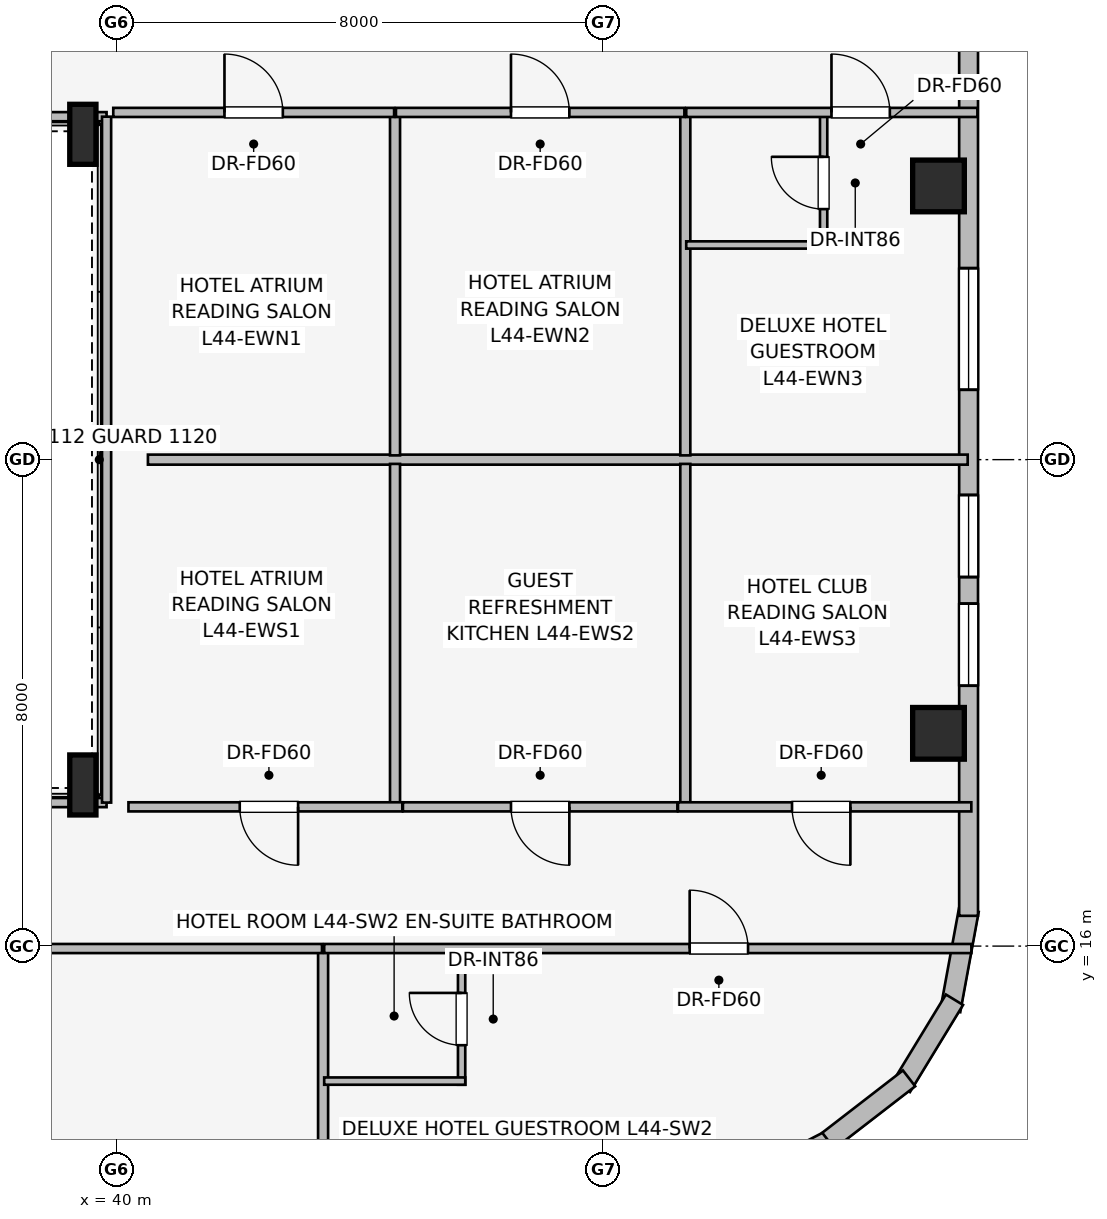
"""IFC4 building model, lengths in metres.
Left out: names, types, materials, properties, quantities, classifications, styles, units other than length and angle.
Written with IfcOpenShell. Run it as: python <this file> out.ifc"""

import sys

from ifc_helpers import new_model, si_unit, direction, frame, frame_2d, origin, origin_2d, place, context, subcontext, project, spatial, rectangle, i_section, extrude, element, fill, save


model = new_model("IFC4")
c1 = context("Model", 3, precision=1e-05, world=origin(), true_north=direction((0.0, 1.0)))
c2 = subcontext(c1, "Body", "Model", "MODEL_VIEW")
j1 = project(units=[si_unit("LENGTHUNIT", "METRE"), si_unit("PLANEANGLEUNIT", "RADIAN")], contexts=[c1])
p1 = place(None, origin())
s1 = spatial("IfcSite", under=j1, at=p1, CompositionType="ELEMENT")
p2 = place(p1, origin())
s2 = spatial("IfcBuilding", under=s1, at=p2, CompositionType="ELEMENT")
p3 = place(p2, frame((0.0, 0.0, 163.65)))
s3 = spatial("IfcBuildingStorey", under=s2, at=p3, CompositionType="ELEMENT", Elevation=163.65)
for number, where, z_axis, x_axis in (
    (1, (53.522, 19.499, 0.0), (0.0, 0.0, 1.0), (1.0, 0.0, 0.0)),
    (2, (53.522, 28.501, 0.0), (0.0, 0.0, 1.0), (1.0, 0.0, 0.0)),
):
    element("IfcColumn", number, at=place(p3, frame(where, z_axis=z_axis, x_axis=x_axis)), inside=s3, PredefinedType="COLUMN", context=c2, shape_type="SweptSolid", body=[
        extrude(rectangle(XDim=0.85, YDim=0.85, at=origin_2d()), origin(), (0.0, 0.0, 1.0), 3.45),
    ])
for number, where, z_axis, x_axis in (
    (3, (39.45, 18.65, 0.0), (0.0, 0.0, 1.0), (1.0, 0.0, 0.0)),
    (4, (39.45, 29.35, 0.0), (0.0, 0.0, 1.0), (1.0, 0.0, 0.0)),
):
    element("IfcColumn", number, at=place(p3, frame(where, z_axis=z_axis, x_axis=x_axis)), inside=s3, PredefinedType="COLUMN", context=c2, shape_type="SweptSolid", body=[
        extrude(i_section(OverallWidth=0.431, OverallDepth=0.987, WebThickness=0.034, FlangeThickness=0.062, at=origin_2d()), origin(), (0.0, 0.0, 1.0), 3.45),
    ])
p4 = place(p3, frame((51.792, 12.847, 0.0), z_axis=(0.0, 0.0, 1.0), x_axis=(-0.888626188278, -0.458632202867, 0.0)))
e5 = element("IfcWall", 5, at=p4, inside=s3, PredefinedType="STANDARD", context=c2, shape_type="SweptSolid", body=[
    extrude(rectangle(XDim=16.828, YDim=0.31, at=frame_2d((8.414, 0.0))), origin(), (0.0, 0.0, 1.0), 3.19),
])
p5 = place(p4, frame((0.675, 0.0, 0.75)))
e6 = element("IfcOpeningElement", 6, at=p5, cuts=e5, PredefinedType="OPENING", context=c2, shape_type="SweptSolid", body=[
    extrude(rectangle(XDim=2.0, YDim=1.5, at=frame_2d((1.0, 0.75))), frame((0.0, 0.165, 0.0), z_axis=(0.0, -1.0, 0.0), x_axis=(1.0, 0.0, 0.0)), (0.0, 0.0, 1.0), 0.33),
])
p6 = place(p4, frame((4.541, 0.0, 0.75)))
e7 = element("IfcOpeningElement", 7, at=p6, cuts=e5, PredefinedType="OPENING", context=c2, shape_type="SweptSolid", body=[
    extrude(rectangle(XDim=1.35, YDim=1.45, at=frame_2d((0.675, 0.725))), frame((0.0, 0.165, 0.0), z_axis=(0.0, -1.0, 0.0), x_axis=(1.0, 0.0, 0.0)), (0.0, 0.0, 1.0), 0.33),
])
p7 = place(p4, frame((7.112, 0.0, 0.75)))
e8 = element("IfcOpeningElement", 8, at=p7, cuts=e5, PredefinedType="OPENING", context=c2, shape_type="SweptSolid", body=[
    extrude(rectangle(XDim=1.35, YDim=1.45, at=frame_2d((0.675, 0.725))), frame((0.0, 0.165, 0.0), z_axis=(0.0, -1.0, 0.0), x_axis=(1.0, 0.0, 0.0)), (0.0, 0.0, 1.0), 0.33),
])
p8 = place(p4, frame((10.348, 0.0, 0.75)))
e9 = element("IfcOpeningElement", 9, at=p8, cuts=e5, PredefinedType="OPENING", context=c2, shape_type="SweptSolid", body=[
    extrude(rectangle(XDim=2.0, YDim=1.5, at=frame_2d((1.0, 0.75))), frame((0.0, 0.165, 0.0), z_axis=(0.0, -1.0, 0.0), x_axis=(1.0, 0.0, 0.0)), (0.0, 0.0, 1.0), 0.33),
])
p9 = place(p4, frame((14.478, 0.0, 0.75)))
e10 = element("IfcOpeningElement", 10, at=p9, cuts=e5, PredefinedType="OPENING", context=c2, shape_type="SweptSolid", body=[
    extrude(rectangle(XDim=1.35, YDim=1.45, at=frame_2d((0.675, 0.725))), frame((0.0, 0.165, 0.0), z_axis=(0.0, -1.0, 0.0), x_axis=(1.0, 0.0, 0.0)), (0.0, 0.0, 1.0), 0.33),
])
p10 = place(p3, frame((54.021, 16.592, 0.0), z_axis=(0.0, 0.0, 1.0), x_axis=(-0.180717642671, -0.983535019014, 0.0)))
e11 = element("IfcWall", 11, at=p10, inside=s3, PredefinedType="STANDARD", context=c2, shape_type="SweptSolid", body=[
    extrude(rectangle(XDim=1.677, YDim=0.33, at=frame_2d((0.838, 0.0))), origin(), (0.0, 0.0, 1.0), 3.19),
])
p11 = place(p3, frame((53.785, 15.118, 0.0), z_axis=(0.0, 0.0, 1.0), x_axis=(-0.520219286058, -0.85403272444, 0.0)))
e12 = element("IfcWall", 12, at=p11, inside=s3, PredefinedType="STANDARD", context=c2, shape_type="SweptSolid", body=[
    extrude(rectangle(XDim=1.678, YDim=0.33, at=frame_2d((0.839, 0.0))), origin(), (0.0, 0.0, 1.0), 3.19),
])
p12 = place(p3, frame((53.038, 13.825, 0.0), z_axis=(0.0, 0.0, 1.0), x_axis=(-0.791464279355, -0.611215423976, 0.0)))
e13 = element("IfcWall", 13, at=p12, inside=s3, PredefinedType="STANDARD", context=c2, shape_type="SweptSolid", body=[
    extrude(rectangle(XDim=1.677, YDim=0.33, at=frame_2d((0.838, 0.0))), origin(), (0.0, 0.0, 1.0), 3.19),
])
p13 = place(p3, frame((54.017, 31.502, 0.0), z_axis=(0.0, 0.0, 1.0), x_axis=(0.0, -1.0, 0.0)))
e14 = element("IfcWall", 14, at=p13, inside=s3, PredefinedType="STANDARD", context=c2, shape_type="SweptSolid", body=[
    extrude(rectangle(XDim=15.004, YDim=0.31, at=frame_2d((7.502, 0.0))), origin(), (0.0, 0.0, 1.0), 3.19),
])
p14 = place(p13, frame((4.353, 0.0, 0.75)))
e15 = element("IfcOpeningElement", 15, at=p14, cuts=e14, PredefinedType="OPENING", context=c2, shape_type="SweptSolid", body=[
    extrude(rectangle(XDim=2.0, YDim=1.5, at=frame_2d((1.0, 0.75))), frame((0.0, 0.165, 0.0), z_axis=(0.0, -1.0, 0.0), x_axis=(1.0, 0.0, 0.0)), (0.0, 0.0, 1.0), 0.33),
])
p15 = place(p13, frame((8.083, 0.0, 0.75)))
e16 = element("IfcOpeningElement", 16, at=p15, cuts=e14, PredefinedType="OPENING", context=c2, shape_type="SweptSolid", body=[
    extrude(rectangle(XDim=1.35, YDim=1.45, at=frame_2d((0.675, 0.725))), frame((0.0, 0.165, 0.0), z_axis=(0.0, -1.0, 0.0), x_axis=(1.0, 0.0, 0.0)), (0.0, 0.0, 1.0), 0.33),
])
p16 = place(p13, frame((9.87, 0.0, 0.75)))
e17 = element("IfcOpeningElement", 17, at=p16, cuts=e14, PredefinedType="OPENING", context=c2, shape_type="SweptSolid", body=[
    extrude(rectangle(XDim=1.35, YDim=1.45, at=frame_2d((0.675, 0.725))), frame((0.0, 0.165, 0.0), z_axis=(0.0, -1.0, 0.0), x_axis=(1.0, 0.0, 0.0)), (0.0, 0.0, 1.0), 0.33),
])
p17 = place(p3, frame((27.675, 18.36, 0.0), z_axis=(0.0, 0.0, 1.0), x_axis=(1.0, 0.0, 0.0)))
e18 = element("IfcWall", 18, at=p17, inside=s3, PredefinedType="PARTITIONING", context=c2, shape_type="SweptSolid", body=[
    extrude(rectangle(XDim=12.165, YDim=0.15, at=frame_2d((6.083, 0.0))), origin(), (0.0, 0.0, 1.0), 2.331),
])
p18 = place(p3, frame((39.84, 29.64, 0.0), z_axis=(0.0, 0.0, 1.0), x_axis=(-1.0, 0.0, 0.0)))
e19 = element("IfcWall", 19, at=p18, inside=s3, PredefinedType="PARTITIONING", context=c2, shape_type="SweptSolid", body=[
    extrude(rectangle(XDim=12.2, YDim=0.15, at=frame_2d((6.1, 0.0))), origin(), (0.0, 0.0, 1.0), 2.331),
])
p19 = place(p3, frame((39.84, 18.36, 0.0), z_axis=(0.0, 0.0, 1.0), x_axis=(0.0, 1.0, 0.0)))
e20 = element("IfcWall", 20, at=p19, inside=s3, PredefinedType="PARTITIONING", context=c2, shape_type="SweptSolid", body=[
    extrude(rectangle(XDim=11.28, YDim=0.15, at=frame_2d((5.64, 0.0))), origin(), (0.0, 0.0, 1.0), 3.19),
])
p20 = place(p3, frame((40.52, 24.0, 0.0), z_axis=(0.0, 0.0, 1.0), x_axis=(1.0, 0.0, 0.0)))
e21 = element("IfcWall", 21, at=p20, inside=s3, PredefinedType="PARTITIONING", context=c2, shape_type="SweptSolid", body=[
    extrude(rectangle(XDim=13.482, YDim=0.165, at=frame_2d((6.741, 0.0))), origin(), (0.0, 0.0, 1.0), 2.494),
])
for number, where, z_axis, x_axis in (
    (22, (44.584, 24.07, 0.0), (0.0, 0.0, 1.0), (0.0, 1.0, 0.0)),
    (23, (49.358, 24.07, 0.0), (0.0, 0.0, 1.0), (0.0, 1.0, 0.0)),
):
    element("IfcWall", number, at=place(p3, frame(where, z_axis=z_axis, x_axis=x_axis)), inside=s3, PredefinedType="PARTITIONING", context=c2, shape_type="SweptSolid", body=[
        extrude(rectangle(XDim=5.64, YDim=0.165, at=frame_2d((2.82, 0.0))), origin(), (0.0, 0.0, 1.0), 3.19),
    ])
p21 = place(p3, frame((39.95, 29.71, 0.0), z_axis=(0.0, 0.0, 1.0), x_axis=(1.0, 0.0, 0.0)))
e24 = element("IfcWall", 24, at=p21, inside=s3, PredefinedType="PARTITIONING", context=c2, shape_type="SweptSolid", body=[
    extrude(rectangle(XDim=4.619, YDim=0.15, at=frame_2d((2.31, 0.0))), origin(), (0.0, 0.0, 1.0), 3.19),
])
p22 = place(p21, frame((1.829, 0.0, 0.0)))
e25 = element("IfcOpeningElement", 25, at=p22, cuts=e24, PredefinedType="OPENING", context=c2, shape_type="SweptSolid", body=[
    extrude(rectangle(XDim=0.96, YDim=2.0, at=frame_2d((0.48, 1.0))), frame((0.0, 0.085, 0.0), z_axis=(0.0, -1.0, 0.0), x_axis=(1.0, 0.0, 0.0)), (0.0, 0.0, 1.0), 0.17),
])
p23 = place(p3, frame((44.599, 29.71, 0.0), z_axis=(0.0, 0.0, 1.0), x_axis=(1.0, 0.0, 0.0)))
e26 = element("IfcWall", 26, at=p23, inside=s3, PredefinedType="PARTITIONING", context=c2, shape_type="SweptSolid", body=[
    extrude(rectangle(XDim=4.744, YDim=0.15, at=frame_2d((2.372, 0.0))), origin(), (0.0, 0.0, 1.0), 3.19),
])
p24 = place(p23, frame((1.892, 0.0, 0.0)))
e27 = element("IfcOpeningElement", 27, at=p24, cuts=e26, PredefinedType="OPENING", context=c2, shape_type="SweptSolid", body=[
    extrude(rectangle(XDim=0.96, YDim=2.0, at=frame_2d((0.48, 1.0))), frame((0.0, 0.085, 0.0), z_axis=(0.0, -1.0, 0.0), x_axis=(1.0, 0.0, 0.0)), (0.0, 0.0, 1.0), 0.17),
])
p25 = place(p3, frame((51.633, 27.47, 0.0), z_axis=(0.0, 0.0, 1.0), x_axis=(0.0, 1.0, 0.0)))
e28 = element("IfcWall", 28, at=p25, inside=s3, PredefinedType="PARTITIONING", context=c2, shape_type="SweptSolid", body=[
    extrude(rectangle(XDim=2.24, YDim=0.12, at=frame_2d((1.12, 0.0))), origin(), (0.0, 0.0, 1.0), 3.19),
])
p26 = place(p25, frame((0.65, 0.0, 0.0)))
e29 = element("IfcOpeningElement", 29, at=p26, cuts=e28, PredefinedType="OPENING", context=c2, shape_type="SweptSolid", body=[
    extrude(rectangle(XDim=0.86, YDim=2.0, at=frame_2d((0.43, 1.0))), frame((0.0, 0.07, 0.0), z_axis=(0.0, -1.0, 0.0), x_axis=(1.0, 0.0, 0.0)), (0.0, 0.0, 1.0), 0.14),
])
p27 = place(p3, frame((49.373, 27.53, 0.0), z_axis=(0.0, 0.0, 1.0), x_axis=(1.0, 0.0, 0.0)))
e30 = element("IfcWall", 30, at=p27, inside=s3, PredefinedType="PARTITIONING", context=c2, shape_type="SweptSolid", body=[
    extrude(rectangle(XDim=2.32, YDim=0.12, at=frame_2d((1.16, 0.0))), origin(), (0.0, 0.0, 1.0), 2.494),
])
p28 = place(p3, frame((49.373, 29.71, 0.0), z_axis=(0.0, 0.0, 1.0), x_axis=(1.0, 0.0, 0.0)))
e31 = element("IfcWall", 31, at=p28, inside=s3, PredefinedType="PARTITIONING", context=c2, shape_type="SweptSolid", body=[
    extrude(rectangle(XDim=4.789, YDim=0.15, at=frame_2d((2.395, 0.0))), origin(), (0.0, 0.0, 1.0), 3.19),
])
p29 = place(p28, frame((2.389, 0.0, 0.0)))
e32 = element("IfcOpeningElement", 32, at=p29, cuts=e31, PredefinedType="OPENING", context=c2, shape_type="SweptSolid", body=[
    extrude(rectangle(XDim=0.96, YDim=2.0, at=frame_2d((0.48, 1.0))), frame((0.0, 0.085, 0.0), z_axis=(0.0, -1.0, 0.0), x_axis=(1.0, 0.0, 0.0)), (0.0, 0.0, 1.0), 0.17),
])
for number, where, z_axis, x_axis in (
    (33, (44.584, 18.29, 0.0), (0.0, 0.0, 1.0), (0.0, 1.0, 0.0)),
    (34, (49.358, 18.29, 0.0), (0.0, 0.0, 1.0), (0.0, 1.0, 0.0)),
):
    element("IfcWall", number, at=place(p3, frame(where, z_axis=z_axis, x_axis=x_axis)), inside=s3, PredefinedType="PARTITIONING", context=c2, shape_type="SweptSolid", body=[
        extrude(rectangle(XDim=5.64, YDim=0.165, at=frame_2d((2.82, 0.0))), origin(), (0.0, 0.0, 1.0), 3.19),
    ])
p30 = place(p3, frame((44.704, 18.29, 0.0), z_axis=(0.0, 0.0, 1.0), x_axis=(-1.0, 0.0, 0.0)))
e35 = element("IfcWall", 35, at=p30, inside=s3, PredefinedType="PARTITIONING", context=c2, shape_type="SweptSolid", body=[
    extrude(rectangle(XDim=4.504, YDim=0.15, at=frame_2d((2.252, 0.0))), origin(), (0.0, 0.0, 1.0), 3.19),
])
p31 = place(p30, frame((1.714, 0.0, 0.0)))
e36 = element("IfcOpeningElement", 36, at=p31, cuts=e35, PredefinedType="OPENING", context=c2, shape_type="SweptSolid", body=[
    extrude(rectangle(XDim=0.96, YDim=2.0, at=frame_2d((0.48, 1.0))), frame((0.0, 0.085, 0.0), z_axis=(0.0, -1.0, 0.0), x_axis=(1.0, 0.0, 0.0)), (0.0, 0.0, 1.0), 0.17),
])
p32 = place(p3, frame((49.228, 18.29, 0.0), z_axis=(0.0, 0.0, 1.0), x_axis=(-1.0, 0.0, 0.0)))
e37 = element("IfcWall", 37, at=p32, inside=s3, PredefinedType="PARTITIONING", context=c2, shape_type="SweptSolid", body=[
    extrude(rectangle(XDim=4.514, YDim=0.15, at=frame_2d((2.257, 0.0))), origin(), (0.0, 0.0, 1.0), 3.19),
])
p33 = place(p32, frame((1.777, 0.0, 0.0)))
e38 = element("IfcOpeningElement", 38, at=p33, cuts=e37, PredefinedType="OPENING", context=c2, shape_type="SweptSolid", body=[
    extrude(rectangle(XDim=0.96, YDim=2.0, at=frame_2d((0.48, 1.0))), frame((0.0, 0.085, 0.0), z_axis=(0.0, -1.0, 0.0), x_axis=(1.0, 0.0, 0.0)), (0.0, 0.0, 1.0), 0.17),
])
p34 = place(p3, frame((54.062, 18.29, 0.0), z_axis=(0.0, 0.0, 1.0), x_axis=(-1.0, 0.0, 0.0)))
e39 = element("IfcWall", 39, at=p34, inside=s3, PredefinedType="PARTITIONING", context=c2, shape_type="SweptSolid", body=[
    extrude(rectangle(XDim=4.824, YDim=0.15, at=frame_2d((2.412, 0.0))), origin(), (0.0, 0.0, 1.0), 3.19),
])
p35 = place(p34, frame((1.989, 0.0, 0.0)))
e40 = element("IfcOpeningElement", 40, at=p35, cuts=e39, PredefinedType="OPENING", context=c2, shape_type="SweptSolid", body=[
    extrude(rectangle(XDim=0.96, YDim=2.0, at=frame_2d((0.48, 1.0))), frame((0.0, 0.085, 0.0), z_axis=(0.0, -1.0, 0.0), x_axis=(1.0, 0.0, 0.0)), (0.0, 0.0, 1.0), 0.17),
])
p36 = place(p3, frame((43.401, 8.533, 0.0), z_axis=(0.0, 0.0, 1.0), x_axis=(0.0, 1.0, 0.0)))
e41 = element("IfcWall", 41, at=p36, inside=s3, PredefinedType="PARTITIONING", context=c2, shape_type="SweptSolid", body=[
    extrude(rectangle(XDim=7.397, YDim=0.165, at=frame_2d((3.698, 0.0))), origin(), (0.0, 0.0, 1.0), 3.19),
])
p37 = place(p3, frame((32.85, 15.96, 0.0), z_axis=(0.0, 0.0, 1.0), x_axis=(1.0, 0.0, 0.0)))
e42 = element("IfcWall", 42, at=p37, inside=s3, PredefinedType="PARTITIONING", context=c2, shape_type="SweptSolid", body=[
    extrude(rectangle(XDim=10.533, YDim=0.15, at=frame_2d((5.267, 0.0))), origin(), (0.0, 0.0, 1.0), 3.19),
])
p38 = place(p37, frame((4.787, 0.0, 0.0)))
e43 = element("IfcOpeningElement", 43, at=p38, cuts=e42, PredefinedType="OPENING", context=c2, shape_type="SweptSolid", body=[
    extrude(rectangle(XDim=0.96, YDim=2.0, at=frame_2d((0.48, 1.0))), frame((0.0, 0.085, 0.0), z_axis=(0.0, -1.0, 0.0), x_axis=(1.0, 0.0, 0.0)), (0.0, 0.0, 1.0), 0.17),
])
p39 = place(p3, frame((45.679, 13.72, 0.0), z_axis=(0.0, 0.0, 1.0), x_axis=(0.0, 1.0, 0.0)))
e44 = element("IfcWall", 44, at=p39, inside=s3, PredefinedType="PARTITIONING", context=c2, shape_type="SweptSolid", body=[
    extrude(rectangle(XDim=2.24, YDim=0.12, at=frame_2d((1.12, 0.0))), origin(), (0.0, 0.0, 1.0), 3.19),
])
p40 = place(p39, frame((0.65, 0.0, 0.0)))
e45 = element("IfcOpeningElement", 45, at=p40, cuts=e44, PredefinedType="OPENING", context=c2, shape_type="SweptSolid", body=[
    extrude(rectangle(XDim=0.86, YDim=2.0, at=frame_2d((0.43, 1.0))), frame((0.0, 0.07, 0.0), z_axis=(0.0, -1.0, 0.0), x_axis=(1.0, 0.0, 0.0)), (0.0, 0.0, 1.0), 0.14),
])
p41 = place(p3, frame((43.419, 13.78, 0.0), z_axis=(0.0, 0.0, 1.0), x_axis=(1.0, 0.0, 0.0)))
e46 = element("IfcWall", 46, at=p41, inside=s3, PredefinedType="PARTITIONING", context=c2, shape_type="SweptSolid", body=[
    extrude(rectangle(XDim=2.32, YDim=0.12, at=frame_2d((1.16, 0.0))), origin(), (0.0, 0.0, 1.0), 3.19),
])
p42 = place(p3, frame((43.419, 15.96, 0.0), z_axis=(0.0, 0.0, 1.0), x_axis=(1.0, 0.0, 0.0)))
e47 = element("IfcWall", 47, at=p42, inside=s3, PredefinedType="PARTITIONING", context=c2, shape_type="SweptSolid", body=[
    extrude(rectangle(XDim=10.644, YDim=0.15, at=frame_2d((5.322, 0.0))), origin(), (0.0, 0.0, 1.0), 3.19),
])
p43 = place(p42, frame((6.011, 0.0, 0.0)))
e48 = element("IfcOpeningElement", 48, at=p43, cuts=e47, PredefinedType="OPENING", context=c2, shape_type="SweptSolid", body=[
    extrude(rectangle(XDim=0.96, YDim=2.0, at=frame_2d((0.48, 1.0))), frame((0.0, 0.085, 0.0), z_axis=(0.0, -1.0, 0.0), x_axis=(1.0, 0.0, 0.0)), (0.0, 0.0, 1.0), 0.17),
])
p44 = place(p14, origin())
e49 = element("IfcWindow", 49, at=p44, inside=s3, PartitioningType="SINGLE_PANEL", PredefinedType="WINDOW", context=c2, shape_type="SweptSolid", body=[
    extrude(rectangle(XDim=2.0, YDim=1.5, at=frame_2d((1.0, 0.75))), frame((0.0, 0.03, 0.0), z_axis=(0.0, -1.0, 0.0), x_axis=(1.0, 0.0, 0.0)), (0.0, 0.0, 1.0), 0.06),
])
fill(e15, e49)
p45 = place(p15, origin())
e50 = element("IfcWindow", 50, at=p45, inside=s3, PartitioningType="SINGLE_PANEL", PredefinedType="WINDOW", context=c2, shape_type="SweptSolid", body=[
    extrude(rectangle(XDim=1.35, YDim=1.45, at=frame_2d((0.675, 0.725))), frame((0.0, 0.03, 0.0), z_axis=(0.0, -1.0, 0.0), x_axis=(1.0, 0.0, 0.0)), (0.0, 0.0, 1.0), 0.06),
])
fill(e16, e50)
p46 = place(p16, origin())
e51 = element("IfcWindow", 51, at=p46, inside=s3, PartitioningType="SINGLE_PANEL", PredefinedType="WINDOW", context=c2, shape_type="SweptSolid", body=[
    extrude(rectangle(XDim=1.35, YDim=1.45, at=frame_2d((0.675, 0.725))), frame((0.0, 0.03, 0.0), z_axis=(0.0, -1.0, 0.0), x_axis=(1.0, 0.0, 0.0)), (0.0, 0.0, 1.0), 0.06),
])
fill(e17, e51)
p47 = place(p22, origin())
e52 = element("IfcDoor", 52, at=p47, inside=s3, OperationType="SINGLE_SWING_LEFT", PredefinedType="DOOR", context=c2, shape_type="SweptSolid", body=[
    extrude(rectangle(XDim=0.96, YDim=2.0, at=frame_2d((0.48, 1.0))), frame((0.0, 0.025, 0.0), z_axis=(0.0, -1.0, 0.0), x_axis=(1.0, 0.0, 0.0)), (0.0, 0.0, 1.0), 0.05),
])
fill(e25, e52)
p48 = place(p24, origin())
e53 = element("IfcDoor", 53, at=p48, inside=s3, OperationType="SINGLE_SWING_LEFT", PredefinedType="DOOR", context=c2, shape_type="SweptSolid", body=[
    extrude(rectangle(XDim=0.96, YDim=2.0, at=frame_2d((0.48, 1.0))), frame((0.0, 0.025, 0.0), z_axis=(0.0, -1.0, 0.0), x_axis=(1.0, 0.0, 0.0)), (0.0, 0.0, 1.0), 0.05),
])
fill(e27, e53)
p49 = place(p26, origin())
e54 = element("IfcDoor", 54, at=p49, inside=s3, OperationType="SINGLE_SWING_RIGHT", PredefinedType="DOOR", context=c2, shape_type="SweptSolid", body=[
    extrude(rectangle(XDim=0.86, YDim=2.0, at=frame_2d((0.43, 1.0))), frame((0.0, 0.025, 0.0), z_axis=(0.0, -1.0, 0.0), x_axis=(1.0, 0.0, 0.0)), (0.0, 0.0, 1.0), 0.05),
])
fill(e29, e54)
p50 = place(p29, origin())
e55 = element("IfcDoor", 55, at=p50, inside=s3, OperationType="SINGLE_SWING_LEFT", PredefinedType="DOOR", context=c2, shape_type="SweptSolid", body=[
    extrude(rectangle(XDim=0.96, YDim=2.0, at=frame_2d((0.48, 1.0))), frame((0.0, 0.025, 0.0), z_axis=(0.0, -1.0, 0.0), x_axis=(1.0, 0.0, 0.0)), (0.0, 0.0, 1.0), 0.05),
])
fill(e32, e55)
p51 = place(p31, origin())
e56 = element("IfcDoor", 56, at=p51, inside=s3, OperationType="SINGLE_SWING_LEFT", PredefinedType="DOOR", context=c2, shape_type="SweptSolid", body=[
    extrude(rectangle(XDim=0.96, YDim=2.0, at=frame_2d((0.48, 1.0))), frame((0.0, 0.025, 0.0), z_axis=(0.0, -1.0, 0.0), x_axis=(1.0, 0.0, 0.0)), (0.0, 0.0, 1.0), 0.05),
])
fill(e36, e56)
p52 = place(p33, origin())
e57 = element("IfcDoor", 57, at=p52, inside=s3, OperationType="SINGLE_SWING_LEFT", PredefinedType="DOOR", context=c2, shape_type="SweptSolid", body=[
    extrude(rectangle(XDim=0.96, YDim=2.0, at=frame_2d((0.48, 1.0))), frame((0.0, 0.025, 0.0), z_axis=(0.0, -1.0, 0.0), x_axis=(1.0, 0.0, 0.0)), (0.0, 0.0, 1.0), 0.05),
])
fill(e38, e57)
p53 = place(p35, origin())
e58 = element("IfcDoor", 58, at=p53, inside=s3, OperationType="SINGLE_SWING_LEFT", PredefinedType="DOOR", context=c2, shape_type="SweptSolid", body=[
    extrude(rectangle(XDim=0.96, YDim=2.0, at=frame_2d((0.48, 1.0))), frame((0.0, 0.025, 0.0), z_axis=(0.0, -1.0, 0.0), x_axis=(1.0, 0.0, 0.0)), (0.0, 0.0, 1.0), 0.05),
])
fill(e40, e58)
p54 = place(p40, origin())
e59 = element("IfcDoor", 59, at=p54, inside=s3, OperationType="SINGLE_SWING_RIGHT", PredefinedType="DOOR", context=c2, shape_type="SweptSolid", body=[
    extrude(rectangle(XDim=0.86, YDim=2.0, at=frame_2d((0.43, 1.0))), frame((0.0, 0.025, 0.0), z_axis=(0.0, -1.0, 0.0), x_axis=(1.0, 0.0, 0.0)), (0.0, 0.0, 1.0), 0.05),
])
fill(e45, e59)
p55 = place(p43, origin())
e60 = element("IfcDoor", 60, at=p55, inside=s3, OperationType="SINGLE_SWING_LEFT", PredefinedType="DOOR", context=c2, shape_type="SweptSolid", body=[
    extrude(rectangle(XDim=0.96, YDim=2.0, at=frame_2d((0.48, 1.0))), frame((0.0, 0.025, 0.0), z_axis=(0.0, -1.0, 0.0), x_axis=(1.0, 0.0, 0.0)), (0.0, 0.0, 1.0), 0.05),
])
fill(e48, e60)
save(model, sys.argv[1])
